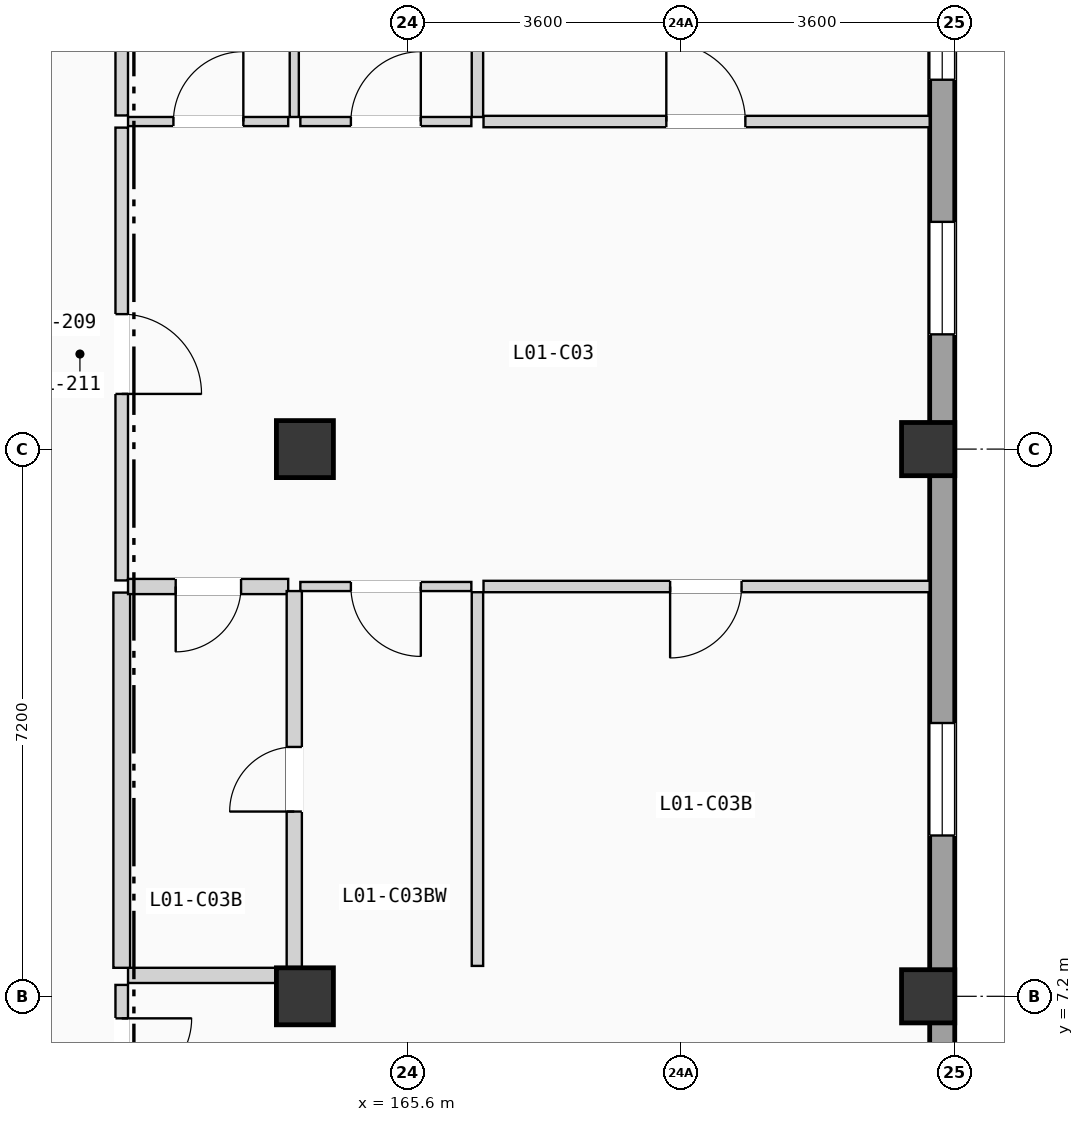
"""IFC4 building model, lengths in metres.
Left out: names, types, materials, properties, quantities, classifications, styles, units other than length and angle.
Written with IfcOpenShell. Run it as: python <this file> out.ifc"""

import sys

from ifc_helpers import new_model, si_unit, direction, frame, frame_2d, origin, origin_2d, place, context, subcontext, project, spatial, rectangle, extrude, element, fill, save


model = new_model("IFC4")
c1 = context("Model", 3, precision=1e-05, world=origin(), true_north=direction((0.0, 1.0)))
c2 = subcontext(c1, "Body", "Model", "MODEL_VIEW")
j1 = project(units=[si_unit("LENGTHUNIT", "METRE"), si_unit("PLANEANGLEUNIT", "RADIAN")], contexts=[c1])
p1 = place(None, origin())
s1 = spatial("IfcSite", under=j1, at=p1, CompositionType="ELEMENT")
p2 = place(p1, origin())
s2 = spatial("IfcBuilding", under=s1, at=p2, CompositionType="ELEMENT")
p3 = place(p2, frame((0.0, 0.0, 4.9)))
s3 = spatial("IfcBuildingStorey", under=s2, at=p3, CompositionType="ELEMENT", Elevation=4.9)
for number, where, z_axis, x_axis in (
    (1, (164.25, 7.2, 0.0), (0.0, 0.0, 1.0), (1.0, 0.0, 0.0)),
    (2, (164.25, 14.4, 0.0), (0.0, 0.0, 1.0), (1.0, 0.0, 0.0)),
):
    element("IfcColumn", number, at=place(p3, frame(where, z_axis=z_axis, x_axis=x_axis)), inside=s3, PredefinedType="COLUMN", context=c2, shape_type="SweptSolid", body=[
        extrude(rectangle(XDim=0.75, YDim=0.75, at=origin_2d()), origin(), (0.0, 0.0, 1.0), 3.675),
    ])
for number, where, z_axis, x_axis in (
    (3, (172.45, 7.2, 0.0), (0.0, 0.0, 1.0), (1.0, 0.0, 0.0)),
    (4, (172.45, 14.4, 0.0), (0.0, 0.0, 1.0), (1.0, 0.0, 0.0)),
):
    element("IfcColumn", number, at=place(p3, frame(where, z_axis=z_axis, x_axis=x_axis)), inside=s3, PredefinedType="COLUMN", context=c2, shape_type="SweptSolid", body=[
        extrude(rectangle(XDim=0.7, YDim=0.7, at=origin_2d()), origin(), (0.0, 0.0, 1.0), 3.675),
    ])
p4 = place(p3, frame((172.635, 0.33, 0.0), z_axis=(0.0, 0.0, 1.0), x_axis=(0.0, 1.0, 0.0)))
e5 = element("IfcWall", 5, at=p4, inside=s3, PredefinedType="SOLIDWALL", context=c2, shape_type="SweptSolid", body=[
    extrude(rectangle(XDim=49.74, YDim=0.33, at=frame_2d((24.87, 0.0))), origin(), (0.0, 0.0, 1.0), 3.415),
])
p5 = place(p4, frame((15.58, 0.0, 0.9)))
e6 = element("IfcOpeningElement", 6, at=p5, cuts=e5, PredefinedType="OPENING", context=c2, shape_type="SweptSolid", body=[
    extrude(rectangle(XDim=1.48, YDim=1.65, at=frame_2d((0.74, 0.825))), frame((0.0, 0.175, 0.0), z_axis=(0.0, -1.0, 0.0), x_axis=(1.0, 0.0, 0.0)), (0.0, 0.0, 1.0), 0.35),
])
p6 = place(p4, frame((8.986, 0.0, 0.9)))
e7 = element("IfcOpeningElement", 7, at=p6, cuts=e5, PredefinedType="OPENING", context=c2, shape_type="SweptSolid", body=[
    extrude(rectangle(XDim=1.48, YDim=1.8, at=frame_2d((0.74, 0.9))), frame((0.0, 0.175, 0.0), z_axis=(0.0, -1.0, 0.0), x_axis=(1.0, 0.0, 0.0)), (0.0, 0.0, 1.0), 0.35),
])
p7 = place(p4, frame((18.93, 0.0, 0.9)))
e8 = element("IfcOpeningElement", 8, at=p7, cuts=e5, PredefinedType="OPENING", context=c2, shape_type="SweptSolid", body=[
    extrude(rectangle(XDim=1.6, YDim=1.2, at=frame_2d((0.8, 0.6))), frame((0.0, 0.175, 0.0), z_axis=(0.0, -1.0, 0.0), x_axis=(1.0, 0.0, 0.0)), (0.0, 0.0, 1.0), 0.35),
])
p8 = place(p4, frame((31.648, 0.0, 0.9)))
e9 = element("IfcOpeningElement", 9, at=p8, cuts=e5, PredefinedType="OPENING", context=c2, shape_type="SweptSolid", body=[
    extrude(rectangle(XDim=1.6, YDim=1.35, at=frame_2d((0.8, 0.675))), frame((0.0, 0.175, 0.0), z_axis=(0.0, -1.0, 0.0), x_axis=(1.0, 0.0, 0.0)), (0.0, 0.0, 1.0), 0.35),
])
p9 = place(p4, frame((25.076, 0.0, 0.9)))
e10 = element("IfcOpeningElement", 10, at=p9, cuts=e5, PredefinedType="OPENING", context=c2, shape_type="SweptSolid", body=[
    extrude(rectangle(XDim=1.6, YDim=1.5, at=frame_2d((0.8, 0.75))), frame((0.0, 0.175, 0.0), z_axis=(0.0, -1.0, 0.0), x_axis=(1.0, 0.0, 0.0)), (0.0, 0.0, 1.0), 0.35),
])
p10 = place(p4, frame((38.778, 0.0, 0.9)))
e11 = element("IfcOpeningElement", 11, at=p10, cuts=e5, PredefinedType="OPENING", context=c2, shape_type="SweptSolid", body=[
    extrude(rectangle(XDim=1.6, YDim=1.65, at=frame_2d((0.8, 0.825))), frame((0.0, 0.175, 0.0), z_axis=(0.0, -1.0, 0.0), x_axis=(1.0, 0.0, 0.0)), (0.0, 0.0, 1.0), 0.35),
])
p11 = place(p3, frame((161.84, 5.515, 0.0), z_axis=(0.0, 0.0, 1.0), x_axis=(0.0, 1.0, 0.0)))
e12 = element("IfcWall", 12, at=p11, inside=s3, PredefinedType="PARTITIONING", context=c2, shape_type="SweptSolid", body=[
    extrude(rectangle(XDim=1.835, YDim=0.165, at=frame_2d((0.917, 0.0))), origin(), (0.0, 0.0, 1.0), 3.395),
])
p12 = place(p11, frame((0.475, 0.0, 0.0)))
e13 = element("IfcOpeningElement", 13, at=p12, cuts=e12, PredefinedType="OPENING", context=c2, shape_type="SweptSolid", body=[
    extrude(rectangle(XDim=0.92, YDim=2.04, at=frame_2d((0.46, 1.02))), frame((0.0, 0.093, 0.0), z_axis=(0.0, -1.0, 0.0), x_axis=(1.0, 0.0, 0.0)), (0.0, 0.0, 1.0), 0.185),
])
p13 = place(p3, frame((161.923, 7.475, 0.0), z_axis=(0.0, 0.0, 1.0), x_axis=(1.0, 0.0, 0.0)))
e14 = element("IfcWall", 14, at=p13, inside=s3, PredefinedType="PLUMBINGWALL", context=c2, shape_type="SweptSolid", body=[
    extrude(rectangle(XDim=2.107, YDim=0.2, at=frame_2d((1.053, 0.0))), origin(), (0.0, 0.0, 1.0), 3.395),
])
p14 = place(p3, frame((161.84, 12.672, 0.0), z_axis=(0.0, 0.0, 1.0), x_axis=(0.0, 1.0, 0.0)))
e15 = element("IfcWall", 15, at=p14, inside=s3, PredefinedType="PARTITIONING", context=c2, shape_type="SweptSolid", body=[
    extrude(rectangle(XDim=5.958, YDim=0.165, at=frame_2d((2.979, 0.0))), origin(), (0.0, 0.0, 1.0), 3.395),
])
p15 = place(p14, frame((2.454, 0.0, 0.0)))
e16 = element("IfcOpeningElement", 16, at=p15, cuts=e15, PredefinedType="OPENING", context=c2, shape_type="SweptSolid", body=[
    extrude(rectangle(XDim=1.05, YDim=2.13, at=frame_2d((0.525, 1.065))), frame((0.0, 0.093, 0.0), z_axis=(0.0, -1.0, 0.0), x_axis=(1.0, 0.0, 0.0)), (0.0, 0.0, 1.0), 0.185),
])
p16 = place(p3, frame((161.84, 7.575, 0.0), z_axis=(0.0, 0.0, 1.0), x_axis=(0.0, 1.0, 0.0)))
e17 = element("IfcWall", 17, at=p16, inside=s3, PredefinedType="PLUMBINGWALL", context=c2, shape_type="SweptSolid", body=[
    extrude(rectangle(XDim=4.937, YDim=0.22, at=frame_2d((2.469, 0.0))), origin(), (0.0, 0.0, 1.0), 3.395),
])
p17 = place(p3, frame((161.84, 18.79, 0.0), z_axis=(0.0, 0.0, 1.0), x_axis=(0.0, 1.0, 0.0)))
e18 = element("IfcWall", 18, at=p17, inside=s3, PredefinedType="PARTITIONING", context=c2, shape_type="SweptSolid", body=[
    extrude(rectangle(XDim=4.912, YDim=0.165, at=frame_2d((2.456, 0.0))), origin(), (0.0, 0.0, 1.0), 3.395),
])
p18 = place(p3, frame((161.923, 12.592, 0.0), z_axis=(0.0, 0.0, 1.0), x_axis=(1.0, 0.0, 0.0)))
e19 = element("IfcWall", 19, at=p18, inside=s3, PredefinedType="PLUMBINGWALL", context=c2, shape_type="SweptSolid", body=[
    extrude(rectangle(XDim=2.107, YDim=0.2, at=frame_2d((1.053, 0.0))), origin(), (0.0, 0.0, 1.0), 3.395),
])
p19 = place(p18, frame((0.627, 0.0, 0.0)))
e20 = element("IfcOpeningElement", 20, at=p19, cuts=e19, PredefinedType="OPENING", context=c2, shape_type="SweptSolid", body=[
    extrude(rectangle(XDim=0.86, YDim=2.0, at=frame_2d((0.43, 1.0))), frame((0.0, 0.11, 0.0), z_axis=(0.0, -1.0, 0.0), x_axis=(1.0, 0.0, 0.0)), (0.0, 0.0, 1.0), 0.22),
])
p20 = place(p3, frame((161.923, 18.71, 0.0), z_axis=(0.0, 0.0, 1.0), x_axis=(1.0, 0.0, 0.0)))
e21 = element("IfcWall", 21, at=p20, inside=s3, PredefinedType="PARTITIONING", context=c2, shape_type="SweptSolid", body=[
    extrude(rectangle(XDim=2.107, YDim=0.12, at=frame_2d((1.053, 0.0))), origin(), (0.0, 0.0, 1.0), 3.395),
])
p21 = place(p20, frame((0.597, 0.0, 0.0)))
e22 = element("IfcOpeningElement", 22, at=p21, cuts=e21, PredefinedType="OPENING", context=c2, shape_type="SweptSolid", body=[
    extrude(rectangle(XDim=0.92, YDim=2.02, at=frame_2d((0.46, 1.01))), frame((0.0, 0.07, 0.0), z_axis=(0.0, -1.0, 0.0), x_axis=(1.0, 0.0, 0.0)), (0.0, 0.0, 1.0), 0.14),
])
p22 = place(p3, frame((166.6, 12.592, 0.0), z_axis=(0.0, 0.0, 1.0), x_axis=(1.0, 0.0, 0.0)))
e23 = element("IfcWall", 23, at=p22, inside=s3, PredefinedType="PARTITIONING", context=c2, shape_type="SweptSolid", body=[
    extrude(rectangle(XDim=5.87, YDim=0.15, at=frame_2d((2.935, 0.0))), origin(), (0.0, 0.0, 1.0), 3.395),
])
p23 = place(p22, frame((2.455, 0.0, 0.0)))
e24 = element("IfcOpeningElement", 24, at=p23, cuts=e23, PredefinedType="OPENING", context=c2, shape_type="SweptSolid", body=[
    extrude(rectangle(XDim=0.94, YDim=2.06, at=frame_2d((0.47, 1.03))), frame((0.0, 0.085, 0.0), z_axis=(0.0, -1.0, 0.0), x_axis=(1.0, 0.0, 0.0)), (0.0, 0.0, 1.0), 0.17),
])
p24 = place(p3, frame((164.19, 12.592, 0.0), z_axis=(0.0, 0.0, 1.0), x_axis=(1.0, 0.0, 0.0)))
e25 = element("IfcWall", 25, at=p24, inside=s3, PredefinedType="PARTITIONING", context=c2, shape_type="SweptSolid", body=[
    extrude(rectangle(XDim=2.25, YDim=0.12, at=frame_2d((1.125, 0.0))), origin(), (0.0, 0.0, 1.0), 3.395),
])
p25 = place(p24, frame((0.665, 0.0, 0.0)))
e26 = element("IfcOpeningElement", 26, at=p25, cuts=e25, PredefinedType="OPENING", context=c2, shape_type="SweptSolid", body=[
    extrude(rectangle(XDim=0.92, YDim=2.02, at=frame_2d((0.46, 1.01))), frame((0.0, 0.07, 0.0), z_axis=(0.0, -1.0, 0.0), x_axis=(1.0, 0.0, 0.0)), (0.0, 0.0, 1.0), 0.14),
])
p26 = place(p3, frame((166.6, 18.71, 0.0), z_axis=(0.0, 0.0, 1.0), x_axis=(1.0, 0.0, 0.0)))
e27 = element("IfcWall", 27, at=p26, inside=s3, PredefinedType="PARTITIONING", context=c2, shape_type="SweptSolid", body=[
    extrude(rectangle(XDim=5.87, YDim=0.15, at=frame_2d((2.935, 0.0))), origin(), (0.0, 0.0, 1.0), 3.395),
])
p27 = place(p26, frame((2.405, 0.0, 0.0)))
e28 = element("IfcOpeningElement", 28, at=p27, cuts=e27, PredefinedType="OPENING", context=c2, shape_type="SweptSolid", body=[
    extrude(rectangle(XDim=1.04, YDim=2.08, at=frame_2d((0.52, 1.04))), frame((0.0, 0.085, 0.0), z_axis=(0.0, -1.0, 0.0), x_axis=(1.0, 0.0, 0.0)), (0.0, 0.0, 1.0), 0.17),
])
p28 = place(p3, frame((164.19, 18.71, 0.0), z_axis=(0.0, 0.0, 1.0), x_axis=(1.0, 0.0, 0.0)))
e29 = element("IfcWall", 29, at=p28, inside=s3, PredefinedType="PARTITIONING", context=c2, shape_type="SweptSolid", body=[
    extrude(rectangle(XDim=2.25, YDim=0.12, at=frame_2d((1.125, 0.0))), origin(), (0.0, 0.0, 1.0), 3.395),
])
p29 = place(p28, frame((0.665, 0.0, 0.0)))
e30 = element("IfcOpeningElement", 30, at=p29, cuts=e29, PredefinedType="OPENING", context=c2, shape_type="SweptSolid", body=[
    extrude(rectangle(XDim=0.92, YDim=2.02, at=frame_2d((0.46, 1.01))), frame((0.0, 0.07, 0.0), z_axis=(0.0, -1.0, 0.0), x_axis=(1.0, 0.0, 0.0)), (0.0, 0.0, 1.0), 0.14),
])
p30 = place(p3, frame((164.11, 7.575, 0.0), z_axis=(0.0, 0.0, 1.0), x_axis=(0.0, 1.0, 0.0)))
e31 = element("IfcWall", 31, at=p30, inside=s3, PredefinedType="PLUMBINGWALL", context=c2, shape_type="SweptSolid", body=[
    extrude(rectangle(XDim=4.957, YDim=0.2, at=frame_2d((2.479, 0.0))), origin(), (0.0, 0.0, 1.0), 3.395),
])
p31 = place(p30, frame((2.056, 0.0, 0.0)))
e32 = element("IfcOpeningElement", 32, at=p31, cuts=e31, PredefinedType="OPENING", context=c2, shape_type="SweptSolid", body=[
    extrude(rectangle(XDim=0.85, YDim=2.01, at=frame_2d((0.425, 1.005))), frame((0.0, 0.11, 0.0), z_axis=(0.0, -1.0, 0.0), x_axis=(1.0, 0.0, 0.0)), (0.0, 0.0, 1.0), 0.22),
])
p32 = place(p3, frame((164.11, 18.77, 0.0), z_axis=(0.0, 0.0, 1.0), x_axis=(0.0, 1.0, 0.0)))
e33 = element("IfcWall", 33, at=p32, inside=s3, PredefinedType="PARTITIONING", context=c2, shape_type="SweptSolid", body=[
    extrude(rectangle(XDim=4.932, YDim=0.12, at=frame_2d((2.466, 0.0))), origin(), (0.0, 0.0, 1.0), 3.395),
])
p33 = place(p3, frame((166.52, 7.6, 0.0), z_axis=(0.0, 0.0, 1.0), x_axis=(0.0, 1.0, 0.0)))
e34 = element("IfcWall", 34, at=p33, inside=s3, PredefinedType="PARTITIONING", context=c2, shape_type="SweptSolid", body=[
    extrude(rectangle(XDim=4.917, YDim=0.15, at=frame_2d((2.458, 0.0))), origin(), (0.0, 0.0, 1.0), 3.395),
])
p34 = place(p3, frame((166.52, 18.77, 0.0), z_axis=(0.0, 0.0, 1.0), x_axis=(0.0, 1.0, 0.0)))
e35 = element("IfcWall", 35, at=p34, inside=s3, PredefinedType="PARTITIONING", context=c2, shape_type="SweptSolid", body=[
    extrude(rectangle(XDim=4.932, YDim=0.15, at=frame_2d((2.466, 0.0))), origin(), (0.0, 0.0, 1.0), 3.395),
])
p35 = place(p5, origin())
e36 = element("IfcWindow", 36, at=p35, inside=s3, PartitioningType="SINGLE_PANEL", PredefinedType="WINDOW", context=c2, shape_type="SweptSolid", body=[
    extrude(rectangle(XDim=1.48, YDim=1.65, at=frame_2d((0.74, 0.825))), frame((0.0, 0.03, 0.0), z_axis=(0.0, -1.0, 0.0), x_axis=(1.0, 0.0, 0.0)), (0.0, 0.0, 1.0), 0.06),
])
fill(e6, e36)
p36 = place(p6, origin())
e37 = element("IfcWindow", 37, at=p36, inside=s3, PartitioningType="SINGLE_PANEL", PredefinedType="WINDOW", context=c2, shape_type="SweptSolid", body=[
    extrude(rectangle(XDim=1.48, YDim=1.8, at=frame_2d((0.74, 0.9))), frame((0.0, 0.03, 0.0), z_axis=(0.0, -1.0, 0.0), x_axis=(1.0, 0.0, 0.0)), (0.0, 0.0, 1.0), 0.06),
])
fill(e7, e37)
p37 = place(p7, origin())
e38 = element("IfcWindow", 38, at=p37, inside=s3, PartitioningType="DOUBLE_PANEL_VERTICAL", PredefinedType="WINDOW", context=c2, shape_type="SweptSolid", body=[
    extrude(rectangle(XDim=1.6, YDim=1.2, at=frame_2d((0.8, 0.6))), frame((0.0, 0.03, 0.0), z_axis=(0.0, -1.0, 0.0), x_axis=(1.0, 0.0, 0.0)), (0.0, 0.0, 1.0), 0.06),
])
fill(e8, e38)
p38 = place(p12, frame((0.92, 0.0, 0.0), z_axis=(0.0, 0.0, 1.0), x_axis=(-1.0, 0.0, 0.0)))
e39 = element("IfcDoor", 39, at=p38, inside=s3, OperationType="SINGLE_SWING_RIGHT", PredefinedType="DOOR", context=c2, shape_type="SweptSolid", body=[
    extrude(rectangle(XDim=0.92, YDim=2.04, at=frame_2d((0.46, 1.02))), frame((0.0, 0.025, 0.0), z_axis=(0.0, -1.0, 0.0), x_axis=(1.0, 0.0, 0.0)), (0.0, 0.0, 1.0), 0.05),
])
fill(e13, e39)
p39 = place(p15, frame((1.05, 0.0, 0.0), z_axis=(0.0, 0.0, 1.0), x_axis=(-1.0, 0.0, 0.0)))
e40 = element("IfcDoor", 40, at=p39, inside=s3, OperationType="SINGLE_SWING_LEFT", PredefinedType="DOOR", context=c2, shape_type="SweptSolid", body=[
    extrude(rectangle(XDim=1.05, YDim=2.13, at=frame_2d((0.525, 1.065))), frame((0.0, 0.025, 0.0), z_axis=(0.0, -1.0, 0.0), x_axis=(1.0, 0.0, 0.0)), (0.0, 0.0, 1.0), 0.05),
])
fill(e16, e40)
p40 = place(p19, frame((0.86, 0.0, 0.0), z_axis=(0.0, 0.0, 1.0), x_axis=(-1.0, 0.0, 0.0)))
e41 = element("IfcDoor", 41, at=p40, inside=s3, OperationType="SINGLE_SWING_LEFT", PredefinedType="DOOR", context=c2, shape_type="SweptSolid", body=[
    extrude(rectangle(XDim=0.86, YDim=2.0, at=frame_2d((0.43, 1.0))), frame((0.0, 0.025, 0.0), z_axis=(0.0, -1.0, 0.0), x_axis=(1.0, 0.0, 0.0)), (0.0, 0.0, 1.0), 0.05),
])
fill(e20, e41)
p41 = place(p21, origin())
e42 = element("IfcDoor", 42, at=p41, inside=s3, OperationType="SINGLE_SWING_RIGHT", PredefinedType="DOOR", context=c2, shape_type="SweptSolid", body=[
    extrude(rectangle(XDim=0.92, YDim=2.02, at=frame_2d((0.46, 1.01))), frame((0.0, 0.025, 0.0), z_axis=(0.0, -1.0, 0.0), x_axis=(1.0, 0.0, 0.0)), (0.0, 0.0, 1.0), 0.05),
])
fill(e22, e42)
p42 = place(p23, frame((0.94, 0.0, 0.0), z_axis=(0.0, 0.0, 1.0), x_axis=(-1.0, 0.0, 0.0)))
e43 = element("IfcDoor", 43, at=p42, inside=s3, OperationType="SINGLE_SWING_LEFT", PredefinedType="DOOR", context=c2, shape_type="SweptSolid", body=[
    extrude(rectangle(XDim=0.94, YDim=2.06, at=frame_2d((0.47, 1.03))), frame((0.0, 0.025, 0.0), z_axis=(0.0, -1.0, 0.0), x_axis=(1.0, 0.0, 0.0)), (0.0, 0.0, 1.0), 0.05),
])
fill(e24, e43)
p43 = place(p25, frame((0.92, 0.0, 0.0), z_axis=(0.0, 0.0, 1.0), x_axis=(-1.0, 0.0, 0.0)))
e44 = element("IfcDoor", 44, at=p43, inside=s3, OperationType="SINGLE_SWING_RIGHT", PredefinedType="DOOR", context=c2, shape_type="SweptSolid", body=[
    extrude(rectangle(XDim=0.92, YDim=2.02, at=frame_2d((0.46, 1.01))), frame((0.0, 0.025, 0.0), z_axis=(0.0, -1.0, 0.0), x_axis=(1.0, 0.0, 0.0)), (0.0, 0.0, 1.0), 0.05),
])
fill(e26, e44)
p44 = place(p27, origin())
e45 = element("IfcDoor", 45, at=p44, inside=s3, OperationType="SINGLE_SWING_LEFT", PredefinedType="DOOR", context=c2, shape_type="SweptSolid", body=[
    extrude(rectangle(XDim=1.04, YDim=2.08, at=frame_2d((0.52, 1.04))), frame((0.0, 0.025, 0.0), z_axis=(0.0, -1.0, 0.0), x_axis=(1.0, 0.0, 0.0)), (0.0, 0.0, 1.0), 0.05),
])
fill(e28, e45)
p45 = place(p29, origin())
e46 = element("IfcDoor", 46, at=p45, inside=s3, OperationType="SINGLE_SWING_RIGHT", PredefinedType="DOOR", context=c2, shape_type="SweptSolid", body=[
    extrude(rectangle(XDim=0.92, YDim=2.02, at=frame_2d((0.46, 1.01))), frame((0.0, 0.025, 0.0), z_axis=(0.0, -1.0, 0.0), x_axis=(1.0, 0.0, 0.0)), (0.0, 0.0, 1.0), 0.05),
])
fill(e30, e46)
p46 = place(p31, origin())
e47 = element("IfcDoor", 47, at=p46, inside=s3, OperationType="SINGLE_SWING_LEFT", PredefinedType="DOOR", context=c2, shape_type="SweptSolid", body=[
    extrude(rectangle(XDim=0.85, YDim=2.01, at=frame_2d((0.425, 1.005))), frame((0.0, 0.025, 0.0), z_axis=(0.0, -1.0, 0.0), x_axis=(1.0, 0.0, 0.0)), (0.0, 0.0, 1.0), 0.05),
])
fill(e32, e47)
save(model, sys.argv[1])
